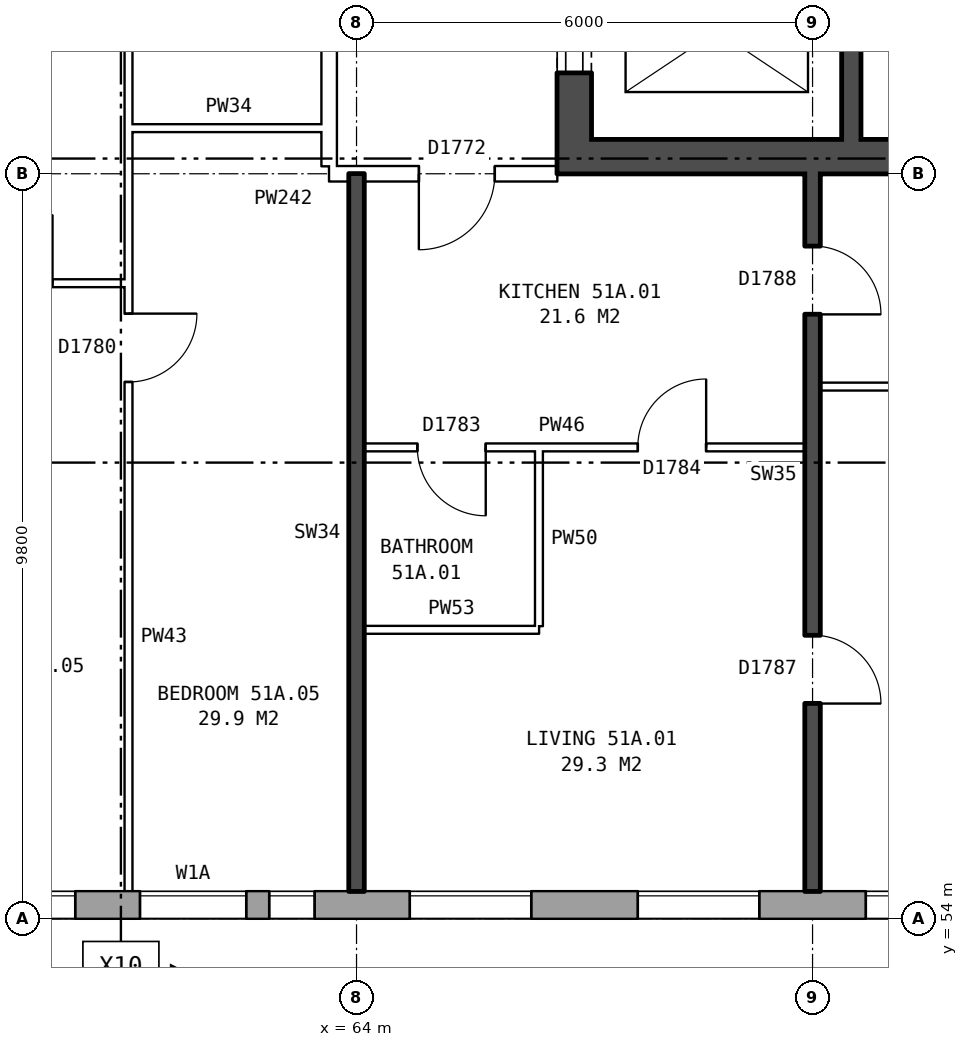
"""IFC4 building model, lengths in metres.
Left out: names, types, materials, properties, quantities, classifications, styles, units other than length and angle.
Written with IfcOpenShell. Run it as: python <this file> out.ifc"""

import sys

from ifc_helpers import new_model, si_unit, direction, frame, frame_2d, origin, place, context, subcontext, project, spatial, rectangle, extrude, element, fill, save


model = new_model("IFC4")
c1 = context("Model", 3, precision=1e-05, world=origin(), true_north=direction((0.0, 1.0)))
c2 = subcontext(c1, "Body", "Model", "MODEL_VIEW")
j1 = project(units=[si_unit("LENGTHUNIT", "METRE"), si_unit("PLANEANGLEUNIT", "RADIAN")], contexts=[c1])
p1 = place(None, origin())
s1 = spatial("IfcSite", under=j1, at=p1, CompositionType="ELEMENT")
p2 = place(p1, origin())
s2 = spatial("IfcBuilding", under=s1, at=p2, CompositionType="ELEMENT")
p3 = place(p2, frame((0.0, 0.0, 182.0)))
s3 = spatial("IfcBuildingStorey", under=s2, at=p3, CompositionType="ELEMENT", Elevation=182.0)
p4 = place(p3, frame((33.325, 54.18, 0.0), z_axis=(0.0, 0.0, 1.0), x_axis=(1.0, 0.0, 0.0)))
e1 = element("IfcWall", 1, at=p4, inside=s3, PredefinedType="STANDARD", context=c2, shape_type="SweptSolid", body=[
    extrude(rectangle(XDim=39.601, YDim=0.36, at=frame_2d((19.8, 0.0))), origin(), (0.0, 0.0, 1.0), 2.85),
])
p5 = place(p4, frame((1.375, 0.0, 0.8)))
e2 = element("IfcOpeningElement", 2, at=p5, cuts=e1, PredefinedType="OPENING", context=c2, shape_type="SweptSolid", body=[
    extrude(rectangle(XDim=1.6, YDim=1.8, at=frame_2d((0.8, 0.9))), frame((0.0, 0.19, 0.0), z_axis=(0.0, -1.0, 0.0), x_axis=(1.0, 0.0, 0.0)), (0.0, 0.0, 1.0), 0.38),
])
p6 = place(p4, frame((4.375, 0.0, 0.8)))
e3 = element("IfcOpeningElement", 3, at=p6, cuts=e1, PredefinedType="OPENING", context=c2, shape_type="SweptSolid", body=[
    extrude(rectangle(XDim=1.6, YDim=1.8, at=frame_2d((0.8, 0.9))), frame((0.0, 0.19, 0.0), z_axis=(0.0, -1.0, 0.0), x_axis=(1.0, 0.0, 0.0)), (0.0, 0.0, 1.0), 0.38),
])
p7 = place(p4, frame((6.875, 0.0, 0.8)))
e4 = element("IfcOpeningElement", 4, at=p7, cuts=e1, PredefinedType="OPENING", context=c2, shape_type="SweptSolid", body=[
    extrude(rectangle(XDim=1.0, YDim=1.8, at=frame_2d((0.5, 0.9))), frame((0.0, 0.19, 0.0), z_axis=(0.0, -1.0, 0.0), x_axis=(1.0, 0.0, 0.0)), (0.0, 0.0, 1.0), 0.38),
])
p8 = place(p4, frame((8.175, 0.0, 1.7)))
e5 = element("IfcOpeningElement", 5, at=p8, cuts=e1, PredefinedType="OPENING", context=c2, shape_type="SweptSolid", body=[
    extrude(rectangle(XDim=0.6, YDim=0.9, at=frame_2d((0.3, 0.45))), frame((0.0, 0.19, 0.0), z_axis=(0.0, -1.0, 0.0), x_axis=(1.0, 0.0, 0.0)), (0.0, 0.0, 1.0), 0.38),
])
p9 = place(p4, frame((13.375, 0.0, 0.8)))
e6 = element("IfcOpeningElement", 6, at=p9, cuts=e1, PredefinedType="OPENING", context=c2, shape_type="SweptSolid", body=[
    extrude(rectangle(XDim=1.6, YDim=1.8, at=frame_2d((0.8, 0.9))), frame((0.0, 0.19, 0.0), z_axis=(0.0, -1.0, 0.0), x_axis=(1.0, 0.0, 0.0)), (0.0, 0.0, 1.0), 0.38),
])
p10 = place(p4, frame((16.375, 0.0, 0.8)))
e7 = element("IfcOpeningElement", 7, at=p10, cuts=e1, PredefinedType="OPENING", context=c2, shape_type="SweptSolid", body=[
    extrude(rectangle(XDim=1.6, YDim=1.8, at=frame_2d((0.8, 0.9))), frame((0.0, 0.19, 0.0), z_axis=(0.0, -1.0, 0.0), x_axis=(1.0, 0.0, 0.0)), (0.0, 0.0, 1.0), 0.38),
])
p11 = place(p4, frame((19.375, 0.0, 0.8)))
e8 = element("IfcOpeningElement", 8, at=p11, cuts=e1, PredefinedType="OPENING", context=c2, shape_type="SweptSolid", body=[
    extrude(rectangle(XDim=1.6, YDim=1.8, at=frame_2d((0.8, 0.9))), frame((0.0, 0.19, 0.0), z_axis=(0.0, -1.0, 0.0), x_axis=(1.0, 0.0, 0.0)), (0.0, 0.0, 1.0), 0.38),
])
p12 = place(p4, frame((22.375, 0.0, 0.8)))
e9 = element("IfcOpeningElement", 9, at=p12, cuts=e1, PredefinedType="OPENING", context=c2, shape_type="SweptSolid", body=[
    extrude(rectangle(XDim=1.6, YDim=1.8, at=frame_2d((0.8, 0.9))), frame((0.0, 0.19, 0.0), z_axis=(0.0, -1.0, 0.0), x_axis=(1.0, 0.0, 0.0)), (0.0, 0.0, 1.0), 0.38),
])
p13 = place(p4, frame((25.375, 0.0, 0.8)))
e10 = element("IfcOpeningElement", 10, at=p13, cuts=e1, PredefinedType="OPENING", context=c2, shape_type="SweptSolid", body=[
    extrude(rectangle(XDim=1.6, YDim=1.8, at=frame_2d((0.8, 0.9))), frame((0.0, 0.19, 0.0), z_axis=(0.0, -1.0, 0.0), x_axis=(1.0, 0.0, 0.0)), (0.0, 0.0, 1.0), 0.38),
])
p14 = place(p4, frame((27.825, 0.0, 0.35)))
e11 = element("IfcOpeningElement", 11, at=p14, cuts=e1, PredefinedType="OPENING", context=c2, shape_type="SweptSolid", body=[
    extrude(rectangle(XDim=1.4, YDim=1.8, at=frame_2d((0.7, 0.9))), frame((0.0, 0.19, 0.0), z_axis=(0.0, -1.0, 0.0), x_axis=(1.0, 0.0, 0.0)), (0.0, 0.0, 1.0), 0.38),
])
p15 = place(p4, frame((31.375, 0.0, 0.8)))
e12 = element("IfcOpeningElement", 12, at=p15, cuts=e1, PredefinedType="OPENING", context=c2, shape_type="SweptSolid", body=[
    extrude(rectangle(XDim=1.6, YDim=1.8, at=frame_2d((0.8, 0.9))), frame((0.0, 0.19, 0.0), z_axis=(0.0, -1.0, 0.0), x_axis=(1.0, 0.0, 0.0)), (0.0, 0.0, 1.0), 0.38),
])
p16 = place(p4, frame((34.375, 0.0, 0.8)))
e13 = element("IfcOpeningElement", 13, at=p16, cuts=e1, PredefinedType="OPENING", context=c2, shape_type="SweptSolid", body=[
    extrude(rectangle(XDim=1.6, YDim=1.8, at=frame_2d((0.8, 0.9))), frame((0.0, 0.19, 0.0), z_axis=(0.0, -1.0, 0.0), x_axis=(1.0, 0.0, 0.0)), (0.0, 0.0, 1.0), 0.38),
])
p17 = place(p4, frame((37.375, 0.0, 0.8)))
e14 = element("IfcOpeningElement", 14, at=p17, cuts=e1, PredefinedType="OPENING", context=c2, shape_type="SweptSolid", body=[
    extrude(rectangle(XDim=1.6, YDim=1.8, at=frame_2d((0.8, 0.9))), frame((0.0, 0.19, 0.0), z_axis=(0.0, -1.0, 0.0), x_axis=(1.0, 0.0, 0.0)), (0.0, 0.0, 1.0), 0.38),
])
p18 = place(p4, frame((9.925, 0.0, 0.8)))
e15 = element("IfcOpeningElement", 15, at=p18, cuts=e1, PredefinedType="OPENING", context=c2, shape_type="SweptSolid", body=[
    extrude(rectangle(XDim=0.6, YDim=0.9, at=frame_2d((0.3, 0.45))), frame((0.0, 0.19, 0.0), z_axis=(0.0, -1.0, 0.0), x_axis=(1.0, 0.0, 0.0)), (0.0, 0.0, 1.0), 0.38),
])
p19 = place(p4, frame((10.875, 0.0, 0.8)))
e16 = element("IfcOpeningElement", 16, at=p19, cuts=e1, PredefinedType="OPENING", context=c2, shape_type="SweptSolid", body=[
    extrude(rectangle(XDim=1.6, YDim=1.8, at=frame_2d((0.8, 0.9))), frame((0.0, 0.19, 0.0), z_axis=(0.0, -1.0, 0.0), x_axis=(1.0, 0.0, 0.0)), (0.0, 0.0, 1.0), 0.38),
])
p20 = place(p4, frame((29.525, 0.0, 0.35)))
e17 = element("IfcOpeningElement", 17, at=p20, cuts=e1, PredefinedType="OPENING", context=c2, shape_type="SweptSolid", body=[
    extrude(rectangle(XDim=0.6, YDim=0.9, at=frame_2d((0.3, 0.45))), frame((0.0, 0.19, 0.0), z_axis=(0.0, -1.0, 0.0), x_axis=(1.0, 0.0, 0.0)), (0.0, 0.0, 1.0), 0.38),
])
p21 = place(p3, frame((66.865, 63.8, 0.0), z_axis=(0.0, 0.0, 1.0), x_axis=(0.0, 1.0, 0.0)))
e18 = element("IfcWall", 18, at=p21, inside=s3, PredefinedType="SHEAR", context=c2, shape_type="SweptSolid", body=[
    extrude(rectangle(XDim=12.4, YDim=0.45, at=frame_2d((6.2, 0.0))), origin(), (0.0, 0.0, 1.0), 2.85),
])
p22 = place(p21, frame((1.325, 0.0, 0.0)))
e19 = element("IfcOpeningElement", 19, at=p22, cuts=e18, PredefinedType="OPENING", context=c2, shape_type="SweptSolid", body=[
    extrude(rectangle(XDim=1.1, YDim=2.1, at=frame_2d((0.55, 1.05))), frame((0.0, 0.235, 0.0), z_axis=(0.0, -1.0, 0.0), x_axis=(1.0, 0.0, 0.0)), (0.0, 0.0, 1.0), 0.47),
])
p23 = place(p21, frame((3.6, 0.0, 0.0)))
e20 = element("IfcOpeningElement", 20, at=p23, cuts=e18, PredefinedType="OPENING", context=c2, shape_type="SweptSolid", body=[
    extrude(rectangle(XDim=1.1, YDim=2.1, at=frame_2d((0.55, 1.05))), frame((0.0, 0.235, 0.0), z_axis=(0.0, -1.0, 0.0), x_axis=(1.0, 0.0, 0.0)), (0.0, 0.0, 1.0), 0.47),
])
p24 = place(p21, frame((5.8, 0.0, 0.0)))
e21 = element("IfcOpeningElement", 21, at=p24, cuts=e18, PredefinedType="OPENING", context=c2, shape_type="SweptSolid", body=[
    extrude(rectangle(XDim=1.1, YDim=2.1, at=frame_2d((0.55, 1.05))), frame((0.0, 0.235, 0.0), z_axis=(0.0, -1.0, 0.0), x_axis=(1.0, 0.0, 0.0)), (0.0, 0.0, 1.0), 0.47),
])
p25 = place(p21, frame((8.0, 0.0, 0.0)))
e22 = element("IfcOpeningElement", 22, at=p25, cuts=e18, PredefinedType="OPENING", context=c2, shape_type="SweptSolid", body=[
    extrude(rectangle(XDim=1.1, YDim=2.1, at=frame_2d((0.55, 1.05))), frame((0.0, 0.235, 0.0), z_axis=(0.0, -1.0, 0.0), x_axis=(1.0, 0.0, 0.0)), (0.0, 0.0, 1.0), 0.47),
])
p26 = place(p21, frame((9.9, 0.0, 0.0)))
e23 = element("IfcOpeningElement", 23, at=p26, cuts=e18, PredefinedType="OPENING", context=c2, shape_type="SweptSolid", body=[
    extrude(rectangle(XDim=1.1, YDim=2.1, at=frame_2d((0.55, 1.05))), frame((0.0, 0.235, 0.0), z_axis=(0.0, -1.0, 0.0), x_axis=(1.0, 0.0, 0.0)), (0.0, 0.0, 1.0), 0.47),
])
p27 = place(p3, frame((67.09, 64.025, 0.0), z_axis=(0.0, 0.0, 1.0), x_axis=(1.0, 0.0, 0.0)))
e24 = element("IfcWall", 24, at=p27, inside=s3, PredefinedType="SHEAR", context=c2, shape_type="SweptSolid", body=[
    extrude(rectangle(XDim=8.1, YDim=0.45, at=frame_2d((4.05, 0.0))), origin(), (0.0, 0.0, 1.0), 2.85),
])
p28 = place(p3, frame((70.51, 64.25, 0.0), z_axis=(0.0, 0.0, 1.0), x_axis=(0.0, 1.0, 0.0)))
e25 = element("IfcWall", 25, at=p28, inside=s3, PredefinedType="SHEAR", context=c2, shape_type="SweptSolid", body=[
    extrude(rectangle(XDim=2.475, YDim=0.25, at=frame_2d((1.238, 0.0))), origin(), (0.0, 0.0, 1.0), 2.85),
])
p29 = place(p3, frame((63.64, 63.9, 0.0), z_axis=(0.0, 0.0, 1.0), x_axis=(0.0, 1.0, 0.0)))
e26 = element("IfcWall", 26, at=p29, inside=s3, PredefinedType="PARTITIONING", context=c2, shape_type="SweptSolid", body=[
    extrude(rectangle(XDim=12.2, YDim=0.2, at=frame_2d((6.1, 0.0))), origin(), (0.0, 0.0, 1.0), 2.85),
])
p30 = place(p29, frame((5.1, 0.0, 0.0)))
e27 = element("IfcOpeningElement", 27, at=p30, cuts=e26, PredefinedType="OPENING", context=c2, shape_type="SweptSolid", body=[
    extrude(rectangle(XDim=2.0, YDim=2.1, at=frame_2d((1.0, 1.05))), frame((0.0, 0.11, 0.0), z_axis=(0.0, -1.0, 0.0), x_axis=(1.0, 0.0, 0.0)), (0.0, 0.0, 1.0), 0.22),
])
p31 = place(p3, frame((64.1, 57.8, 0.0), z_axis=(0.0, 0.0, 1.0), x_axis=(1.0, 0.0, 0.0)))
e28 = element("IfcWall", 28, at=p31, inside=s3, PredefinedType="PARTITIONING", context=c2, shape_type="SweptSolid", body=[
    extrude(rectangle(XDim=2.3, YDim=0.1, at=frame_2d((1.15, 0.0))), origin(), (0.0, 0.0, 1.0), 2.85),
])
p32 = place(p3, frame((64.1, 60.2, 0.0), z_axis=(0.0, 0.0, 1.0), x_axis=(1.0, 0.0, 0.0)))
e29 = element("IfcWall", 29, at=p32, inside=s3, PredefinedType="PARTITIONING", context=c2, shape_type="SweptSolid", body=[
    extrude(rectangle(XDim=5.8, YDim=0.1, at=frame_2d((2.9, 0.0))), origin(), (0.0, 0.0, 1.0), 2.85),
])
p33 = place(p32, frame((3.6, 0.0, 0.0)))
e30 = element("IfcOpeningElement", 30, at=p33, cuts=e29, PredefinedType="OPENING", context=c2, shape_type="SweptSolid", body=[
    extrude(rectangle(XDim=0.9, YDim=2.1, at=frame_2d((0.45, 1.05))), frame((0.0, 0.06, 0.0), z_axis=(0.0, -1.0, 0.0), x_axis=(1.0, 0.0, 0.0)), (0.0, 0.0, 1.0), 0.12),
])
p34 = place(p32, frame((0.7, 0.0, 0.0)))
e31 = element("IfcOpeningElement", 31, at=p34, cuts=e29, PredefinedType="OPENING", context=c2, shape_type="SweptSolid", body=[
    extrude(rectangle(XDim=0.9, YDim=2.1, at=frame_2d((0.45, 1.05))), frame((0.0, 0.06, 0.0), z_axis=(0.0, -1.0, 0.0), x_axis=(1.0, 0.0, 0.0)), (0.0, 0.0, 1.0), 0.12),
])
p35 = place(p3, frame((70.1, 61.0, 0.0), z_axis=(0.0, 0.0, 1.0), x_axis=(1.0, 0.0, 0.0)))
e32 = element("IfcWall", 32, at=p35, inside=s3, PredefinedType="PARTITIONING", context=c2, shape_type="SweptSolid", body=[
    extrude(rectangle(XDim=5.54, YDim=0.1, at=frame_2d((2.77, 0.0))), origin(), (0.0, 0.0, 1.0), 2.85),
])
p36 = place(p3, frame((58.1, 62.36, 0.0), z_axis=(0.0, 0.0, 1.0), x_axis=(1.0, 0.0, 0.0)))
e33 = element("IfcWall", 33, at=p36, inside=s3, PredefinedType="PARTITIONING", context=c2, shape_type="SweptSolid", body=[
    extrude(rectangle(XDim=2.9, YDim=0.1, at=frame_2d((1.45, 0.0))), origin(), (0.0, 0.0, 1.0), 2.85),
])
p37 = place(p36, frame((1.0, 0.0, 0.0)))
e34 = element("IfcOpeningElement", 34, at=p37, cuts=e33, PredefinedType="OPENING", context=c2, shape_type="SweptSolid", body=[
    extrude(rectangle(XDim=0.9, YDim=2.1, at=frame_2d((0.45, 1.05))), frame((0.0, 0.06, 0.0), z_axis=(0.0, -1.0, 0.0), x_axis=(1.0, 0.0, 0.0)), (0.0, 0.0, 1.0), 0.12),
])
p38 = place(p3, frame((63.64, 63.8, 0.0), z_axis=(0.0, 0.0, 1.0), x_axis=(1.0, 0.0, 0.0)))
e35 = element("IfcWall", 35, at=p38, inside=s3, PredefinedType="PARTITIONING", context=c2, shape_type="SweptSolid", body=[
    extrude(rectangle(XDim=3.0, YDim=0.2, at=frame_2d((1.5, 0.0))), origin(), (0.0, 0.0, 1.0), 2.85),
])
p39 = place(p38, frame((1.18, 0.0, 0.0)))
e36 = element("IfcOpeningElement", 36, at=p39, cuts=e35, PredefinedType="OPENING", context=c2, shape_type="SweptSolid", body=[
    extrude(rectangle(XDim=1.0, YDim=2.1, at=frame_2d((0.5, 1.05))), frame((0.0, 0.11, 0.0), z_axis=(0.0, -1.0, 0.0), x_axis=(1.0, 0.0, 0.0)), (0.0, 0.0, 1.0), 0.22),
])
p40 = place(p3, frame((61.0, 64.4, 0.0), z_axis=(0.0, 0.0, 1.0), x_axis=(1.0, 0.0, 0.0)))
e37 = element("IfcWall", 37, at=p40, inside=s3, PredefinedType="PARTITIONING", context=c2, shape_type="SweptSolid", body=[
    extrude(rectangle(XDim=2.64, YDim=0.1, at=frame_2d((1.32, 0.0))), origin(), (0.0, 0.0, 1.0), 2.85),
])
p41 = place(p3, frame((61.0, 54.36, 0.0), z_axis=(0.0, 0.0, 1.0), x_axis=(0.0, 1.0, 0.0)))
e38 = element("IfcWall", 38, at=p41, inside=s3, PredefinedType="PARTITIONING", context=c2, shape_type="SweptSolid", body=[
    extrude(rectangle(XDim=14.34, YDim=0.1, at=frame_2d((7.17, 0.0))), origin(), (0.0, 0.0, 1.0), 2.85),
])
p42 = place(p41, frame((6.7, 0.0, 0.0)))
e39 = element("IfcOpeningElement", 39, at=p42, cuts=e38, PredefinedType="OPENING", context=c2, shape_type="SweptSolid", body=[
    extrude(rectangle(XDim=0.9, YDim=2.1, at=frame_2d((0.45, 1.05))), frame((0.0, 0.06, 0.0), z_axis=(0.0, -1.0, 0.0), x_axis=(1.0, 0.0, 0.0)), (0.0, 0.0, 1.0), 0.12),
])
p43 = place(p41, frame((13.04, 0.0, 0.0)))
e40 = element("IfcOpeningElement", 40, at=p43, cuts=e38, PredefinedType="OPENING", context=c2, shape_type="SweptSolid", body=[
    extrude(rectangle(XDim=0.9, YDim=2.1, at=frame_2d((0.45, 1.05))), frame((0.0, 0.06, 0.0), z_axis=(0.0, -1.0, 0.0), x_axis=(1.0, 0.0, 0.0)), (0.0, 0.0, 1.0), 0.12),
])
p44 = place(p3, frame((64.0, 54.36, 0.0), z_axis=(0.0, 0.0, 1.0), x_axis=(0.0, 1.0, 0.0)))
e41 = element("IfcWall", 41, at=p44, inside=s3, PredefinedType="SOLIDWALL", context=c2, shape_type="SweptSolid", body=[
    extrude(rectangle(XDim=9.44, YDim=0.2, at=frame_2d((4.72, 0.0))), origin(), (0.0, 0.0, 1.0), 2.85),
])
p45 = place(p3, frame((66.4, 57.85, 0.0), z_axis=(0.0, 0.0, 1.0), x_axis=(0.0, 1.0, 0.0)))
e42 = element("IfcWall", 42, at=p45, inside=s3, PredefinedType="PARTITIONING", context=c2, shape_type="SweptSolid", body=[
    extrude(rectangle(XDim=2.3, YDim=0.1, at=frame_2d((1.15, 0.0))), origin(), (0.0, 0.0, 1.0), 2.85),
])
p46 = place(p3, frame((70.0, 54.36, 0.0), z_axis=(0.0, 0.0, 1.0), x_axis=(0.0, 1.0, 0.0)))
e43 = element("IfcWall", 43, at=p46, inside=s3, PredefinedType="SOLIDWALL", context=c2, shape_type="SweptSolid", body=[
    extrude(rectangle(XDim=9.44, YDim=0.2, at=frame_2d((4.72, 0.0))), origin(), (0.0, 0.0, 1.0), 2.85),
])
p47 = place(p46, frame((2.47, 0.0, 0.0)))
e44 = element("IfcOpeningElement", 44, at=p47, cuts=e43, PredefinedType="OPENING", context=c2, shape_type="SweptSolid", body=[
    extrude(rectangle(XDim=0.9, YDim=2.1, at=frame_2d((0.45, 1.05))), frame((0.0, 0.11, 0.0), z_axis=(0.0, -1.0, 0.0), x_axis=(1.0, 0.0, 0.0)), (0.0, 0.0, 1.0), 0.22),
])
p48 = place(p46, frame((7.59, 0.0, 0.0)))
e45 = element("IfcOpeningElement", 45, at=p48, cuts=e43, PredefinedType="OPENING", context=c2, shape_type="SweptSolid", body=[
    extrude(rectangle(XDim=0.9, YDim=2.1, at=frame_2d((0.45, 1.05))), frame((0.0, 0.11, 0.0), z_axis=(0.0, -1.0, 0.0), x_axis=(1.0, 0.0, 0.0)), (0.0, 0.0, 1.0), 0.22),
])
p49 = place(p13, origin())
e46 = element("IfcWindow", 46, at=p49, inside=s3, PartitioningType="SINGLE_PANEL", PredefinedType="WINDOW", context=c2, shape_type="SweptSolid", body=[
    extrude(rectangle(XDim=1.6, YDim=1.8, at=frame_2d((0.8, 0.9))), frame((0.0, 0.15, 0.0), z_axis=(0.0, -1.0, 0.0), x_axis=(1.0, 0.0, 0.0)), (0.0, 0.0, 1.0), 0.06),
])
fill(e10, e46)
p50 = place(p14, origin())
e47 = element("IfcWindow", 47, at=p50, inside=s3, PartitioningType="SINGLE_PANEL", PredefinedType="WINDOW", context=c2, shape_type="SweptSolid", body=[
    extrude(rectangle(XDim=1.4, YDim=1.8, at=frame_2d((0.7, 0.9))), frame((0.0, 0.15, 0.0), z_axis=(0.0, -1.0, 0.0), x_axis=(1.0, 0.0, 0.0)), (0.0, 0.0, 1.0), 0.06),
])
fill(e11, e47)
p51 = place(p15, origin())
e48 = element("IfcWindow", 48, at=p51, inside=s3, PartitioningType="SINGLE_PANEL", PredefinedType="WINDOW", context=c2, shape_type="SweptSolid", body=[
    extrude(rectangle(XDim=1.6, YDim=1.8, at=frame_2d((0.8, 0.9))), frame((0.0, 0.15, 0.0), z_axis=(0.0, -1.0, 0.0), x_axis=(1.0, 0.0, 0.0)), (0.0, 0.0, 1.0), 0.06),
])
fill(e12, e48)
p52 = place(p16, origin())
e49 = element("IfcWindow", 49, at=p52, inside=s3, PartitioningType="SINGLE_PANEL", PredefinedType="WINDOW", context=c2, shape_type="SweptSolid", body=[
    extrude(rectangle(XDim=1.6, YDim=1.8, at=frame_2d((0.8, 0.9))), frame((0.0, 0.15, 0.0), z_axis=(0.0, -1.0, 0.0), x_axis=(1.0, 0.0, 0.0)), (0.0, 0.0, 1.0), 0.06),
])
fill(e13, e49)
p53 = place(p17, origin())
e50 = element("IfcWindow", 50, at=p53, inside=s3, PartitioningType="SINGLE_PANEL", PredefinedType="WINDOW", context=c2, shape_type="SweptSolid", body=[
    extrude(rectangle(XDim=1.6, YDim=1.8, at=frame_2d((0.8, 0.9))), frame((0.0, 0.15, 0.0), z_axis=(0.0, -1.0, 0.0), x_axis=(1.0, 0.0, 0.0)), (0.0, 0.0, 1.0), 0.06),
])
fill(e14, e50)
p54 = place(p22, origin())
e51 = element("IfcDoor", 51, at=p54, inside=s3, OperationType="DOUBLE_DOOR_SLIDING", PredefinedType="DOOR", context=c2, shape_type="SweptSolid", body=[
    extrude(rectangle(XDim=1.1, YDim=2.1, at=frame_2d((0.55, 1.05))), frame((0.0, -0.16, 0.0), z_axis=(0.0, -1.0, 0.0), x_axis=(1.0, 0.0, 0.0)), (0.0, 0.0, 1.0), 0.05),
])
fill(e19, e51)
p55 = place(p47, frame((0.9, 0.0, 0.0), z_axis=(0.0, 0.0, 1.0), x_axis=(-1.0, 0.0, 0.0)))
e52 = element("IfcDoor", 52, at=p55, inside=s3, OperationType="SINGLE_SWING_RIGHT", PredefinedType="DOOR", context=c2, shape_type="SweptSolid", body=[
    extrude(rectangle(XDim=0.9, YDim=2.1, at=frame_2d((0.45, 1.05))), frame((0.0, 0.025, 0.0), z_axis=(0.0, -1.0, 0.0), x_axis=(1.0, 0.0, 0.0)), (0.0, 0.0, 1.0), 0.05),
])
fill(e44, e52)
p56 = place(p48, frame((0.9, 0.0, 0.0), z_axis=(0.0, 0.0, 1.0), x_axis=(-1.0, 0.0, 0.0)))
e53 = element("IfcDoor", 53, at=p56, inside=s3, OperationType="SINGLE_SWING_RIGHT", PredefinedType="DOOR", context=c2, shape_type="SweptSolid", body=[
    extrude(rectangle(XDim=0.9, YDim=2.1, at=frame_2d((0.45, 1.05))), frame((0.0, 0.025, 0.0), z_axis=(0.0, -1.0, 0.0), x_axis=(1.0, 0.0, 0.0)), (0.0, 0.0, 1.0), 0.05),
])
fill(e45, e53)
p57 = place(p39, frame((1.0, 0.0, 0.0), z_axis=(0.0, 0.0, 1.0), x_axis=(-1.0, 0.0, 0.0)))
e54 = element("IfcDoor", 54, at=p57, inside=s3, OperationType="SINGLE_SWING_RIGHT", PredefinedType="DOOR", context=c2, shape_type="SweptSolid", body=[
    extrude(rectangle(XDim=1.0, YDim=2.1, at=frame_2d((0.5, 1.05))), frame((0.0, 0.025, 0.0), z_axis=(0.0, -1.0, 0.0), x_axis=(1.0, 0.0, 0.0)), (0.0, 0.0, 1.0), 0.05),
])
fill(e36, e54)
p58 = place(p33, origin())
e55 = element("IfcDoor", 55, at=p58, inside=s3, OperationType="SINGLE_SWING_RIGHT", PredefinedType="DOOR", context=c2, shape_type="SweptSolid", body=[
    extrude(rectangle(XDim=0.9, YDim=2.1, at=frame_2d((0.45, 1.05))), frame((0.0, 0.025, 0.0), z_axis=(0.0, -1.0, 0.0), x_axis=(1.0, 0.0, 0.0)), (0.0, 0.0, 1.0), 0.05),
])
fill(e30, e55)
p59 = place(p34, frame((0.9, 0.0, 0.0), z_axis=(0.0, 0.0, 1.0), x_axis=(-1.0, 0.0, 0.0)))
e56 = element("IfcDoor", 56, at=p59, inside=s3, OperationType="SINGLE_SWING_LEFT", PredefinedType="DOOR", context=c2, shape_type="SweptSolid", body=[
    extrude(rectangle(XDim=0.9, YDim=2.1, at=frame_2d((0.45, 1.05))), frame((0.0, 0.025, 0.0), z_axis=(0.0, -1.0, 0.0), x_axis=(1.0, 0.0, 0.0)), (0.0, 0.0, 1.0), 0.05),
])
fill(e31, e56)
p60 = place(p42, frame((0.9, 0.0, 0.0), z_axis=(0.0, 0.0, 1.0), x_axis=(-1.0, 0.0, 0.0)))
e57 = element("IfcDoor", 57, at=p60, inside=s3, OperationType="SINGLE_SWING_LEFT", PredefinedType="DOOR", context=c2, shape_type="SweptSolid", body=[
    extrude(rectangle(XDim=0.9, YDim=2.1, at=frame_2d((0.45, 1.05))), frame((0.0, 0.025, 0.0), z_axis=(0.0, -1.0, 0.0), x_axis=(1.0, 0.0, 0.0)), (0.0, 0.0, 1.0), 0.05),
])
fill(e39, e57)
p61 = place(p20, origin())
e58 = element("IfcWindow", 58, at=p61, inside=s3, PartitioningType="SINGLE_PANEL", PredefinedType="WINDOW", context=c2, shape_type="SweptSolid", body=[
    extrude(rectangle(XDim=0.6, YDim=0.9, at=frame_2d((0.3, 0.45))), frame((0.0, 0.15, 0.0), z_axis=(0.0, -1.0, 0.0), x_axis=(1.0, 0.0, 0.0)), (0.0, 0.0, 1.0), 0.06),
])
fill(e17, e58)
save(model, sys.argv[1])
